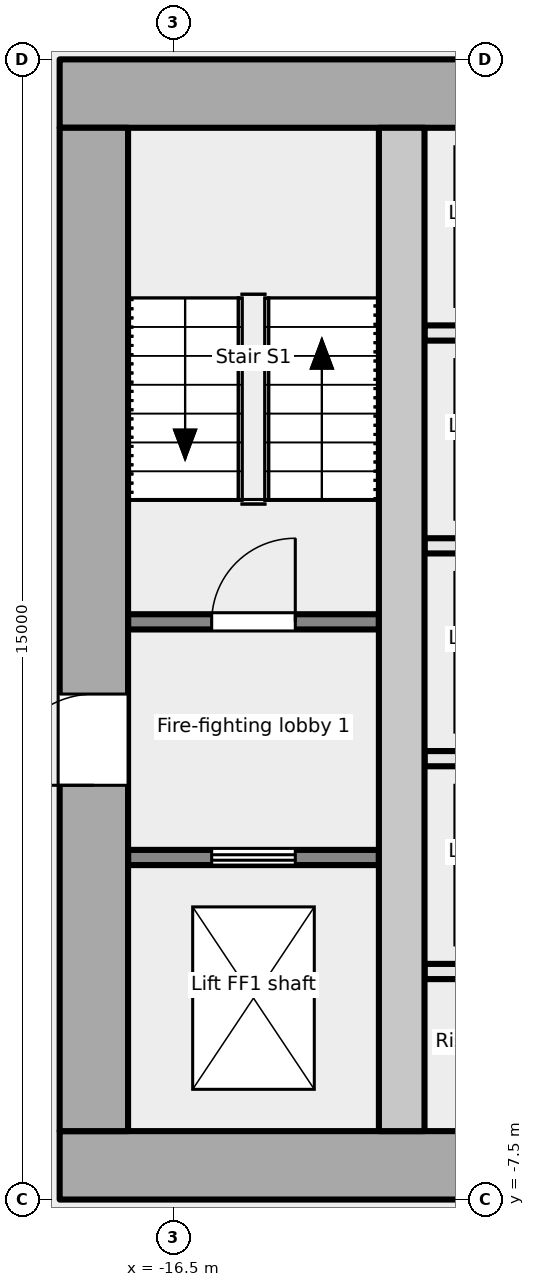
"""IFC4 building model, lengths in metres.
Left out: names, types, materials, properties, quantities, classifications, styles, units other than length and angle.
Written with IfcOpenShell. Run it as: python <this file> out.ifc"""

import sys

from ifc_helpers import new_model, si_unit, direction, frame, frame_2d, origin, place, context, subcontext, project, spatial, rectangle, extrude, element, fill, save


model = new_model("IFC4")
c1 = context("Model", 3, precision=1e-05, world=origin(), true_north=direction((0.0, 1.0)))
c2 = subcontext(c1, "Body", "Model", "MODEL_VIEW")
j1 = project(units=[si_unit("LENGTHUNIT", "METRE"), si_unit("PLANEANGLEUNIT", "RADIAN")], contexts=[c1])
p1 = place(None, origin())
s1 = spatial("IfcSite", under=j1, at=p1, CompositionType="ELEMENT")
p2 = place(p1, origin())
s2 = spatial("IfcBuilding", under=s1, at=p2, CompositionType="ELEMENT")
p3 = place(p2, frame((0.0, 0.0, 74.3)))
s3 = spatial("IfcBuildingStorey", under=s2, at=p3, CompositionType="ELEMENT", Elevation=74.3)
p4 = place(p3, frame((-18.0, -7.05, -0.2), z_axis=(0.0, 0.0, 1.0), x_axis=(1.0, 0.0, 0.0)))
e1 = element("IfcWall", 1, at=p4, inside=s3, PredefinedType="SHEAR", context=c2, shape_type="SweptSolid", body=[
    extrude(rectangle(XDim=36.0, YDim=0.9, at=frame_2d((18.0, 0.0))), origin(), (0.0, 0.0, 1.0), 5.4),
])
p5 = place(p4, frame((7.8, 0.0, 0.2)))
e2 = element("IfcOpeningElement", 2, at=p5, cuts=e1, PredefinedType="OPENING", context=c2, shape_type="SweptSolid", body=[
    extrude(rectangle(XDim=2.4, YDim=2.1, at=frame_2d((1.2, 1.05))), frame((0.0, 0.46, 0.0), z_axis=(0.0, -1.0, 0.0), x_axis=(1.0, 0.0, 0.0)), (0.0, 0.0, 1.0), 0.921),
])
p6 = place(p4, frame((17.4, 0.0, 0.2)))
e3 = element("IfcOpeningElement", 3, at=p6, cuts=e1, PredefinedType="OPENING", context=c2, shape_type="SweptSolid", body=[
    extrude(rectangle(XDim=1.2, YDim=2.1, at=frame_2d((0.6, 1.05))), frame((0.0, 0.46, 0.0), z_axis=(0.0, -1.0, 0.0), x_axis=(1.0, 0.0, 0.0)), (0.0, 0.0, 1.0), 0.921),
])
p7 = place(p4, frame((26.1, 0.0, 0.2)))
e4 = element("IfcOpeningElement", 4, at=p7, cuts=e1, PredefinedType="OPENING", context=c2, shape_type="SweptSolid", body=[
    extrude(rectangle(XDim=2.4, YDim=2.1, at=frame_2d((1.2, 1.05))), frame((0.0, 0.46, 0.0), z_axis=(0.0, -1.0, 0.0), x_axis=(1.0, 0.0, 0.0)), (0.0, 0.0, 1.0), 0.921),
])
p8 = place(p3, frame((-18.0, 7.05, -0.2), z_axis=(0.0, 0.0, 1.0), x_axis=(1.0, 0.0, 0.0)))
e5 = element("IfcWall", 5, at=p8, inside=s3, PredefinedType="SHEAR", context=c2, shape_type="SweptSolid", body=[
    extrude(rectangle(XDim=36.0, YDim=0.9, at=frame_2d((18.0, 0.0))), origin(), (0.0, 0.0, 1.0), 5.4),
])
p9 = place(p3, frame((-17.55, -6.6, -0.2), z_axis=(0.0, 0.0, 1.0), x_axis=(0.0, 1.0, 0.0)))
e6 = element("IfcWall", 6, at=p9, inside=s3, PredefinedType="SHEAR", context=c2, shape_type="SweptSolid", body=[
    extrude(rectangle(XDim=13.2, YDim=0.9, at=frame_2d((6.6, 0.0))), origin(), (0.0, 0.0, 1.0), 5.4),
])
p10 = place(p9, frame((4.55, 0.0, 0.2)))
e7 = element("IfcOpeningElement", 7, at=p10, cuts=e6, PredefinedType="OPENING", context=c2, shape_type="SweptSolid", body=[
    extrude(rectangle(XDim=1.2, YDim=2.1, at=frame_2d((0.6, 1.05))), frame((0.0, 0.46, 0.0), z_axis=(0.0, -1.0, 0.0), x_axis=(1.0, 0.0, 0.0)), (0.0, 0.0, 1.0), 0.921),
])
p11 = place(p3, frame((-13.5, -6.6, -0.2), z_axis=(0.0, 0.0, 1.0), x_axis=(0.0, 1.0, 0.0)))
e8 = element("IfcWall", 8, at=p11, inside=s3, PredefinedType="SHEAR", context=c2, shape_type="SweptSolid", body=[
    extrude(rectangle(XDim=13.2, YDim=0.6, at=frame_2d((6.6, 0.0))), origin(), (0.0, 0.0, 1.0), 5.4),
])
p12 = place(p3, frame((-17.1, -3.0, 0.0), z_axis=(0.0, 0.0, 1.0), x_axis=(1.0, 0.0, 0.0)))
e9 = element("IfcWall", 9, at=p12, inside=s3, PredefinedType="PARTITIONING", context=c2, shape_type="SweptSolid", body=[
    extrude(rectangle(XDim=3.3, YDim=0.2, at=frame_2d((1.65, 0.0))), origin(), (0.0, 0.0, 1.0), 5.2),
])
p13 = place(p12, frame((1.1, 0.0, 0.0)))
e10 = element("IfcOpeningElement", 10, at=p13, cuts=e9, PredefinedType="OPENING", context=c2, shape_type="SweptSolid", body=[
    extrude(rectangle(XDim=1.1, YDim=2.1, at=frame_2d((0.55, 1.05))), frame((0.0, 0.111, 0.0), z_axis=(0.0, -1.0, 0.0), x_axis=(1.0, 0.0, 0.0)), (0.0, 0.0, 1.0), 0.221),
])
p14 = place(p3, frame((-17.1, 0.1, 0.0), z_axis=(0.0, 0.0, 1.0), x_axis=(1.0, 0.0, 0.0)))
e11 = element("IfcWall", 11, at=p14, inside=s3, PredefinedType="PARTITIONING", context=c2, shape_type="SweptSolid", body=[
    extrude(rectangle(XDim=3.3, YDim=0.2, at=frame_2d((1.65, 0.0))), origin(), (0.0, 0.0, 1.0), 5.2),
])
p15 = place(p14, frame((1.1, 0.0, 0.0)))
e12 = element("IfcOpeningElement", 12, at=p15, cuts=e11, PredefinedType="OPENING", context=c2, shape_type="SweptSolid", body=[
    extrude(rectangle(XDim=1.1, YDim=2.1, at=frame_2d((0.55, 1.05))), frame((0.0, 0.111, 0.0), z_axis=(0.0, -1.0, 0.0), x_axis=(1.0, 0.0, 0.0)), (0.0, 0.0, 1.0), 0.221),
])
for number, where, z_axis, x_axis in (
    (13, (-13.2, -1.7, 0.0), (0.0, 0.0, 1.0), (1.0, 0.0, 0.0)),
    (14, (-13.2, 1.1, 0.0), (0.0, 0.0, 1.0), (1.0, 0.0, 0.0)),
    (15, (-13.2, 3.9, 0.0), (0.0, 0.0, 1.0), (1.0, 0.0, 0.0)),
    (16, (-13.2, -4.5, 0.0), (0.0, 0.0, 1.0), (1.0, 0.0, 0.0)),
):
    element("IfcWall", number, at=place(p3, frame(where, z_axis=z_axis, x_axis=x_axis)), inside=s3, PredefinedType="PARTITIONING", context=c2, shape_type="SweptSolid", body=[
        extrude(rectangle(XDim=2.3, YDim=0.2, at=frame_2d((1.15, 0.0))), origin(), (0.0, 0.0, 1.0), 5.2),
    ])
p16 = place(p13, origin())
e17 = element("IfcDoor", 17, at=p16, inside=s3, OperationType="DOUBLE_DOOR_SLIDING", PredefinedType="DOOR", context=c2, shape_type="SweptSolid", body=[
    extrude(rectangle(XDim=1.1, YDim=2.1, at=frame_2d((0.55, 1.05))), frame((0.0, 0.025, 0.0), z_axis=(0.0, -1.0, 0.0), x_axis=(1.0, 0.0, 0.0)), (0.0, 0.0, 1.0), 0.05),
])
fill(e10, e17)
p17 = place(p10, origin())
e18 = element("IfcDoor", 18, at=p17, inside=s3, OperationType="SINGLE_SWING_LEFT", PredefinedType="DOOR", context=c2, shape_type="SweptSolid", body=[
    extrude(rectangle(XDim=1.2, YDim=2.1, at=frame_2d((0.6, 1.05))), frame((0.0, 0.025, 0.0), z_axis=(0.0, -1.0, 0.0), x_axis=(1.0, 0.0, 0.0)), (0.0, 0.0, 1.0), 0.05),
])
fill(e7, e18)
p18 = place(p15, origin())
e19 = element("IfcDoor", 19, at=p18, inside=s3, OperationType="SINGLE_SWING_RIGHT", PredefinedType="DOOR", context=c2, shape_type="SweptSolid", body=[
    extrude(rectangle(XDim=1.1, YDim=2.1, at=frame_2d((0.55, 1.05))), frame((0.0, 0.025, 0.0), z_axis=(0.0, -1.0, 0.0), x_axis=(1.0, 0.0, 0.0)), (0.0, 0.0, 1.0), 0.05),
])
fill(e12, e19)
save(model, sys.argv[1])
